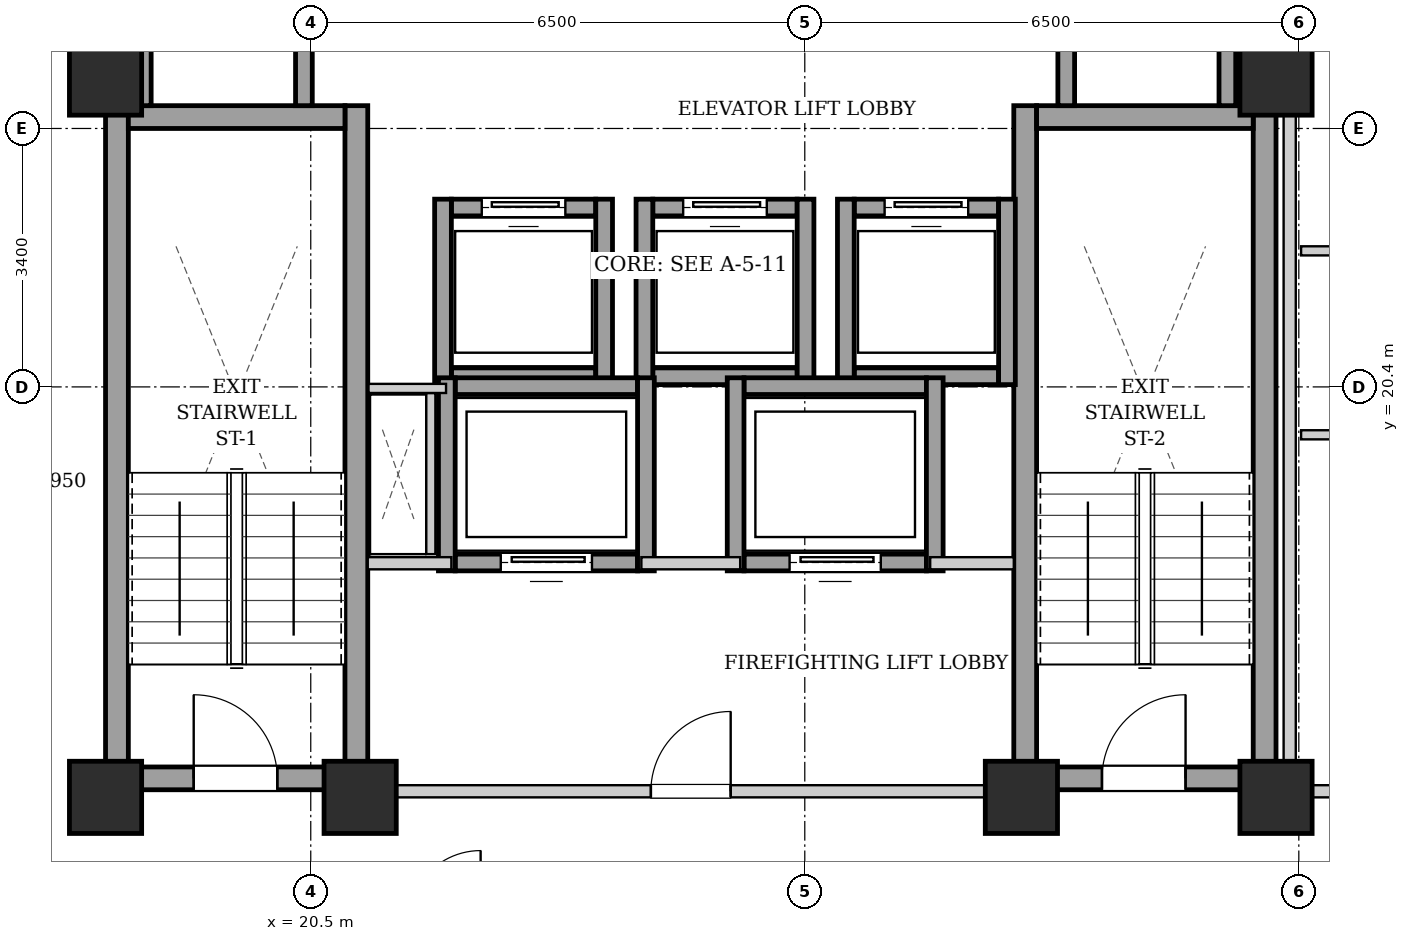
"""IFC4 building model, lengths in metres.
Left out: names, types, materials, properties, quantities, classifications, styles, units other than length and angle.
Written with IfcOpenShell. Run it as: python <this file> out.ifc"""

import sys

from ifc_helpers import new_model, si_unit, direction, frame, frame_2d, origin, origin_2d, place, context, subcontext, project, spatial, rectangle, extrude, element, fill, save


model = new_model("IFC4")
c1 = context("Model", 3, precision=1e-05, world=origin(), true_north=direction((0.0, 1.0)))
c2 = subcontext(c1, "Body", "Model", "MODEL_VIEW")
j1 = project(units=[si_unit("LENGTHUNIT", "METRE"), si_unit("PLANEANGLEUNIT", "RADIAN")], contexts=[c1])
p1 = place(None, origin())
s1 = spatial("IfcSite", under=j1, at=p1, CompositionType="ELEMENT")
p2 = place(p1, origin())
s2 = spatial("IfcBuilding", under=s1, at=p2, CompositionType="ELEMENT")
p3 = place(p2, frame((0.0, 0.0, 147.15)))
s3 = spatial("IfcBuildingStorey", under=s2, at=p3, CompositionType="ELEMENT", Elevation=147.15)
for number, where, z_axis, x_axis in (
    (1, (17.8, 15.0, 0.0), (0.0, 0.0, 1.0), (1.0, 0.0, 0.0)),
    (2, (21.15, 15.0, 0.0), (0.0, 0.0, 1.0), (1.0, 0.0, 0.0)),
    (3, (29.85, 15.0, 0.0), (0.0, 0.0, 1.0), (1.0, 0.0, 0.0)),
    (4, (33.2, 15.0, 0.0), (0.0, 0.0, 1.0), (1.0, 0.0, 0.0)),
    (5, (17.8, 24.45, 0.0), (0.0, 0.0, 1.0), (1.0, 0.0, 0.0)),
    (6, (33.2, 24.45, 0.0), (0.0, 0.0, 1.0), (1.0, 0.0, 0.0)),
):
    element("IfcColumn", number, at=place(p3, frame(where, z_axis=z_axis, x_axis=x_axis)), inside=s3, PredefinedType="COLUMN", context=c2, shape_type="SweptSolid", body=[
        extrude(rectangle(XDim=0.95, YDim=0.95, at=origin_2d()), origin(), (0.0, 0.0, 1.0), 3.25),
    ])
for number, where, z_axis, x_axis in (
    (7, (17.95, 15.1, 0.0), (0.0, 0.0, 1.0), (0.0, 1.0, 0.0)),
    (8, (21.1, 15.1, 0.0), (0.0, 0.0, 1.0), (0.0, 1.0, 0.0)),
):
    element("IfcWall", number, at=place(p3, frame(where, z_axis=z_axis, x_axis=x_axis)), inside=s3, PredefinedType="SHEAR", context=c2, shape_type="SweptSolid", body=[
        extrude(rectangle(XDim=9.0, YDim=0.3, at=frame_2d((4.5, 0.0))), origin(), (0.0, 0.0, 1.0), 2.99),
    ])
p4 = place(p3, frame((18.1, 23.95, 0.0), z_axis=(0.0, 0.0, 1.0), x_axis=(1.0, 0.0, 0.0)))
e9 = element("IfcWall", 9, at=p4, inside=s3, PredefinedType="SHEAR", context=c2, shape_type="SweptSolid", body=[
    extrude(rectangle(XDim=2.85, YDim=0.3, at=frame_2d((1.425, 0.0))), origin(), (0.0, 0.0, 1.0), 2.99),
])
p5 = place(p3, frame((18.1, 15.25, 0.0), z_axis=(0.0, 0.0, 1.0), x_axis=(1.0, 0.0, 0.0)))
e10 = element("IfcWall", 10, at=p5, inside=s3, PredefinedType="SHEAR", context=c2, shape_type="SweptSolid", body=[
    extrude(rectangle(XDim=2.85, YDim=0.3, at=frame_2d((1.425, 0.0))), origin(), (0.0, 0.0, 1.0), 2.99),
])
p6 = place(p5, frame((0.86, 0.0, 0.0)))
e11 = element("IfcOpeningElement", 11, at=p6, cuts=e10, PredefinedType="OPENING", context=c2, shape_type="SweptSolid", body=[
    extrude(rectangle(XDim=1.1, YDim=2.05, at=frame_2d((0.55, 1.025))), frame((0.0, 0.16, 0.0), z_axis=(0.0, -1.0, 0.0), x_axis=(1.0, 0.0, 0.0)), (0.0, 0.0, 1.0), 0.32),
])
for number, where, z_axis, x_axis in (
    (12, (29.9, 15.1, 0.0), (0.0, 0.0, 1.0), (0.0, 1.0, 0.0)),
    (13, (33.05, 15.1, 0.0), (0.0, 0.0, 1.0), (0.0, 1.0, 0.0)),
):
    element("IfcWall", number, at=place(p3, frame(where, z_axis=z_axis, x_axis=x_axis)), inside=s3, PredefinedType="SHEAR", context=c2, shape_type="SweptSolid", body=[
        extrude(rectangle(XDim=9.0, YDim=0.3, at=frame_2d((4.5, 0.0))), origin(), (0.0, 0.0, 1.0), 2.99),
    ])
p7 = place(p3, frame((30.05, 23.95, 0.0), z_axis=(0.0, 0.0, 1.0), x_axis=(1.0, 0.0, 0.0)))
e14 = element("IfcWall", 14, at=p7, inside=s3, PredefinedType="SHEAR", context=c2, shape_type="SweptSolid", body=[
    extrude(rectangle(XDim=2.85, YDim=0.3, at=frame_2d((1.425, 0.0))), origin(), (0.0, 0.0, 1.0), 2.99),
])
p8 = place(p3, frame((30.05, 15.25, 0.0), z_axis=(0.0, 0.0, 1.0), x_axis=(1.0, 0.0, 0.0)))
e15 = element("IfcWall", 15, at=p8, inside=s3, PredefinedType="SHEAR", context=c2, shape_type="SweptSolid", body=[
    extrude(rectangle(XDim=2.85, YDim=0.3, at=frame_2d((1.425, 0.0))), origin(), (0.0, 0.0, 1.0), 2.99),
])
p9 = place(p8, frame((0.86, 0.0, 0.0)))
e16 = element("IfcOpeningElement", 16, at=p9, cuts=e15, PredefinedType="OPENING", context=c2, shape_type="SweptSolid", body=[
    extrude(rectangle(XDim=1.1, YDim=2.05, at=frame_2d((0.55, 1.025))), frame((0.0, 0.16, 0.0), z_axis=(0.0, -1.0, 0.0), x_axis=(1.0, 0.0, 0.0)), (0.0, 0.0, 1.0), 0.32),
])
p10 = place(p3, frame((22.35, 20.54, 0.0), z_axis=(0.0, 0.0, 1.0), x_axis=(1.0, 0.0, 0.0)))
e17 = element("IfcWall", 17, at=p10, inside=s3, PredefinedType="SHEAR", context=c2, shape_type="SweptSolid", body=[
    extrude(rectangle(XDim=1.9, YDim=0.22, at=frame_2d((0.95, 0.0))), origin(), (0.0, 0.0, 1.0), 2.99),
])
p11 = place(p3, frame((22.35, 22.76, 0.0), z_axis=(0.0, 0.0, 1.0), x_axis=(1.0, 0.0, 0.0)))
e18 = element("IfcWall", 18, at=p11, inside=s3, PredefinedType="SHEAR", context=c2, shape_type="SweptSolid", body=[
    extrude(rectangle(XDim=1.9, YDim=0.22, at=frame_2d((0.95, 0.0))), origin(), (0.0, 0.0, 1.0), 2.99),
])
p12 = place(p11, frame((0.4, 0.0, 0.0)))
e19 = element("IfcOpeningElement", 19, at=p12, cuts=e18, PredefinedType="OPENING", context=c2, shape_type="SweptSolid", body=[
    extrude(rectangle(XDim=1.1, YDim=2.15, at=frame_2d((0.55, 1.075))), frame((0.0, 0.12, 0.0), z_axis=(0.0, -1.0, 0.0), x_axis=(1.0, 0.0, 0.0)), (0.0, 0.0, 1.0), 0.24),
])
for number, where, z_axis, x_axis in (
    (20, (22.24, 20.43, 0.0), (0.0, 0.0, 1.0), (0.0, 1.0, 0.0)),
    (21, (24.36, 20.43, 0.0), (0.0, 0.0, 1.0), (0.0, 1.0, 0.0)),
):
    element("IfcWall", number, at=place(p3, frame(where, z_axis=z_axis, x_axis=x_axis)), inside=s3, PredefinedType="SHEAR", context=c2, shape_type="SweptSolid", body=[
        extrude(rectangle(XDim=2.44, YDim=0.22, at=frame_2d((1.22, 0.0))), origin(), (0.0, 0.0, 1.0), 2.99),
    ])
p13 = place(p3, frame((25.0, 20.54, 0.0), z_axis=(0.0, 0.0, 1.0), x_axis=(1.0, 0.0, 0.0)))
e22 = element("IfcWall", 22, at=p13, inside=s3, PredefinedType="SHEAR", context=c2, shape_type="SweptSolid", body=[
    extrude(rectangle(XDim=1.9, YDim=0.22, at=frame_2d((0.95, 0.0))), origin(), (0.0, 0.0, 1.0), 2.99),
])
p14 = place(p3, frame((25.0, 22.76, 0.0), z_axis=(0.0, 0.0, 1.0), x_axis=(1.0, 0.0, 0.0)))
e23 = element("IfcWall", 23, at=p14, inside=s3, PredefinedType="SHEAR", context=c2, shape_type="SweptSolid", body=[
    extrude(rectangle(XDim=1.9, YDim=0.22, at=frame_2d((0.95, 0.0))), origin(), (0.0, 0.0, 1.0), 2.99),
])
p15 = place(p14, frame((0.4, 0.0, 0.0)))
e24 = element("IfcOpeningElement", 24, at=p15, cuts=e23, PredefinedType="OPENING", context=c2, shape_type="SweptSolid", body=[
    extrude(rectangle(XDim=1.1, YDim=2.15, at=frame_2d((0.55, 1.075))), frame((0.0, 0.12, 0.0), z_axis=(0.0, -1.0, 0.0), x_axis=(1.0, 0.0, 0.0)), (0.0, 0.0, 1.0), 0.24),
])
for number, where, z_axis, x_axis in (
    (25, (24.89, 20.43, 0.0), (0.0, 0.0, 1.0), (0.0, 1.0, 0.0)),
    (26, (27.01, 20.43, 0.0), (0.0, 0.0, 1.0), (0.0, 1.0, 0.0)),
):
    element("IfcWall", number, at=place(p3, frame(where, z_axis=z_axis, x_axis=x_axis)), inside=s3, PredefinedType="SHEAR", context=c2, shape_type="SweptSolid", body=[
        extrude(rectangle(XDim=2.44, YDim=0.22, at=frame_2d((1.22, 0.0))), origin(), (0.0, 0.0, 1.0), 2.99),
    ])
p16 = place(p3, frame((27.65, 20.54, 0.0), z_axis=(0.0, 0.0, 1.0), x_axis=(1.0, 0.0, 0.0)))
e27 = element("IfcWall", 27, at=p16, inside=s3, PredefinedType="SHEAR", context=c2, shape_type="SweptSolid", body=[
    extrude(rectangle(XDim=1.9, YDim=0.22, at=frame_2d((0.95, 0.0))), origin(), (0.0, 0.0, 1.0), 2.99),
])
p17 = place(p3, frame((27.65, 22.76, 0.0), z_axis=(0.0, 0.0, 1.0), x_axis=(1.0, 0.0, 0.0)))
e28 = element("IfcWall", 28, at=p17, inside=s3, PredefinedType="SHEAR", context=c2, shape_type="SweptSolid", body=[
    extrude(rectangle(XDim=1.9, YDim=0.22, at=frame_2d((0.95, 0.0))), origin(), (0.0, 0.0, 1.0), 2.99),
])
p18 = place(p17, frame((0.4, 0.0, 0.0)))
e29 = element("IfcOpeningElement", 29, at=p18, cuts=e28, PredefinedType="OPENING", context=c2, shape_type="SweptSolid", body=[
    extrude(rectangle(XDim=1.1, YDim=2.15, at=frame_2d((0.55, 1.075))), frame((0.0, 0.12, 0.0), z_axis=(0.0, -1.0, 0.0), x_axis=(1.0, 0.0, 0.0)), (0.0, 0.0, 1.0), 0.24),
])
for number, where, z_axis, x_axis in (
    (30, (27.54, 20.43, 0.0), (0.0, 0.0, 1.0), (0.0, 1.0, 0.0)),
    (31, (29.66, 20.43, 0.0), (0.0, 0.0, 1.0), (0.0, 1.0, 0.0)),
):
    element("IfcWall", number, at=place(p3, frame(where, z_axis=z_axis, x_axis=x_axis)), inside=s3, PredefinedType="SHEAR", context=c2, shape_type="SweptSolid", body=[
        extrude(rectangle(XDim=2.44, YDim=0.22, at=frame_2d((1.22, 0.0))), origin(), (0.0, 0.0, 1.0), 2.99),
    ])
p19 = place(p3, frame((18.29, 24.1, 0.0), z_axis=(0.0, 0.0, 1.0), x_axis=(0.0, 1.0, 0.0)))
e32 = element("IfcWall", 32, at=p19, inside=s3, PredefinedType="SHEAR", context=c2, shape_type="SweptSolid", body=[
    extrude(rectangle(XDim=4.14, YDim=0.22, at=frame_2d((2.07, 0.0))), origin(), (0.0, 0.0, 1.0), 2.99),
])
p20 = place(p3, frame((20.41, 24.1, 0.0), z_axis=(0.0, 0.0, 1.0), x_axis=(0.0, 1.0, 0.0)))
e33 = element("IfcWall", 33, at=p20, inside=s3, PredefinedType="SHEAR", context=c2, shape_type="SweptSolid", body=[
    extrude(rectangle(XDim=1.96, YDim=0.22, at=frame_2d((0.98, 0.0))), origin(), (0.0, 0.0, 1.0), 2.99),
])
for number, where, z_axis, x_axis in (
    (34, (30.44, 24.1, 0.0), (0.0, 0.0, 1.0), (0.0, 1.0, 0.0)),
    (35, (32.56, 24.1, 0.0), (0.0, 0.0, 1.0), (0.0, 1.0, 0.0)),
):
    element("IfcWall", number, at=place(p3, frame(where, z_axis=z_axis, x_axis=x_axis)), inside=s3, PredefinedType="SHEAR", context=c2, shape_type="SweptSolid", body=[
        extrude(rectangle(XDim=2.07, YDim=0.22, at=frame_2d((1.035, 0.0))), origin(), (0.0, 0.0, 1.0), 2.99),
    ])
p21 = place(p3, frame((22.4, 18.09, 0.0), z_axis=(0.0, 0.0, 1.0), x_axis=(1.0, 0.0, 0.0)))
e36 = element("IfcWall", 36, at=p21, inside=s3, PredefinedType="SHEAR", context=c2, shape_type="SweptSolid", body=[
    extrude(rectangle(XDim=2.4, YDim=0.22, at=frame_2d((1.2, 0.0))), origin(), (0.0, 0.0, 1.0), 2.99),
])
p22 = place(p21, frame((0.6, 0.0, 0.0)))
e37 = element("IfcOpeningElement", 37, at=p22, cuts=e36, PredefinedType="OPENING", context=c2, shape_type="SweptSolid", body=[
    extrude(rectangle(XDim=1.2, YDim=2.15, at=frame_2d((0.6, 1.075))), frame((0.0, 0.12, 0.0), z_axis=(0.0, -1.0, 0.0), x_axis=(1.0, 0.0, 0.0)), (0.0, 0.0, 1.0), 0.24),
])
p23 = place(p3, frame((22.4, 20.41, 0.0), z_axis=(0.0, 0.0, 1.0), x_axis=(1.0, 0.0, 0.0)))
e38 = element("IfcWall", 38, at=p23, inside=s3, PredefinedType="SHEAR", context=c2, shape_type="SweptSolid", body=[
    extrude(rectangle(XDim=2.4, YDim=0.22, at=frame_2d((1.2, 0.0))), origin(), (0.0, 0.0, 1.0), 2.99),
])
for number, where, z_axis, x_axis in (
    (39, (22.29, 17.98, 0.0), (0.0, 0.0, 1.0), (0.0, 1.0, 0.0)),
    (40, (24.91, 17.98, 0.0), (0.0, 0.0, 1.0), (0.0, 1.0, 0.0)),
):
    element("IfcWall", number, at=place(p3, frame(where, z_axis=z_axis, x_axis=x_axis)), inside=s3, PredefinedType="SHEAR", context=c2, shape_type="SweptSolid", body=[
        extrude(rectangle(XDim=2.54, YDim=0.22, at=frame_2d((1.27, 0.0))), origin(), (0.0, 0.0, 1.0), 2.99),
    ])
p24 = place(p3, frame((26.2, 18.09, 0.0), z_axis=(0.0, 0.0, 1.0), x_axis=(1.0, 0.0, 0.0)))
e41 = element("IfcWall", 41, at=p24, inside=s3, PredefinedType="SHEAR", context=c2, shape_type="SweptSolid", body=[
    extrude(rectangle(XDim=2.4, YDim=0.22, at=frame_2d((1.2, 0.0))), origin(), (0.0, 0.0, 1.0), 2.99),
])
p25 = place(p24, frame((0.6, 0.0, 0.0)))
e42 = element("IfcOpeningElement", 42, at=p25, cuts=e41, PredefinedType="OPENING", context=c2, shape_type="SweptSolid", body=[
    extrude(rectangle(XDim=1.2, YDim=2.15, at=frame_2d((0.6, 1.075))), frame((0.0, 0.12, 0.0), z_axis=(0.0, -1.0, 0.0), x_axis=(1.0, 0.0, 0.0)), (0.0, 0.0, 1.0), 0.24),
])
p26 = place(p3, frame((26.2, 20.41, 0.0), z_axis=(0.0, 0.0, 1.0), x_axis=(1.0, 0.0, 0.0)))
e43 = element("IfcWall", 43, at=p26, inside=s3, PredefinedType="SHEAR", context=c2, shape_type="SweptSolid", body=[
    extrude(rectangle(XDim=2.4, YDim=0.22, at=frame_2d((1.2, 0.0))), origin(), (0.0, 0.0, 1.0), 2.99),
])
for number, where, z_axis, x_axis in (
    (44, (26.09, 17.98, 0.0), (0.0, 0.0, 1.0), (0.0, 1.0, 0.0)),
    (45, (28.71, 17.98, 0.0), (0.0, 0.0, 1.0), (0.0, 1.0, 0.0)),
):
    element("IfcWall", number, at=place(p3, frame(where, z_axis=z_axis, x_axis=x_axis)), inside=s3, PredefinedType="SHEAR", context=c2, shape_type="SweptSolid", body=[
        extrude(rectangle(XDim=2.54, YDim=0.22, at=frame_2d((1.27, 0.0))), origin(), (0.0, 0.0, 1.0), 2.99),
    ])
p27 = place(p3, frame((21.25, 15.08, 0.0), z_axis=(0.0, 0.0, 1.0), x_axis=(1.0, 0.0, 0.0)))
e46 = element("IfcWall", 46, at=p27, inside=s3, PredefinedType="PARTITIONING", context=c2, shape_type="SweptSolid", body=[
    extrude(rectangle(XDim=8.5, YDim=0.16, at=frame_2d((4.25, 0.0))), origin(), (0.0, 0.0, 1.0), 2.442),
])
p28 = place(p27, frame((3.725, 0.0, 0.0)))
e47 = element("IfcOpeningElement", 47, at=p28, cuts=e46, PredefinedType="OPENING", context=c2, shape_type="SweptSolid", body=[
    extrude(rectangle(XDim=1.05, YDim=2.05, at=frame_2d((0.525, 1.025))), frame((0.0, 0.09, 0.0), z_axis=(0.0, -1.0, 0.0), x_axis=(1.0, 0.0, 0.0)), (0.0, 0.0, 1.0), 0.18),
])
p29 = place(p3, frame((21.25, 18.08, 0.0), z_axis=(0.0, 0.0, 1.0), x_axis=(1.0, 0.0, 0.0)))
e48 = element("IfcWall", 48, at=p29, inside=s3, PredefinedType="PARTITIONING", context=c2, shape_type="SweptSolid", body=[
    extrude(rectangle(XDim=1.1, YDim=0.16, at=frame_2d((0.55, 0.0))), origin(), (0.0, 0.0, 1.0), 2.99),
])
p30 = place(p3, frame((24.85, 18.08, 0.0), z_axis=(0.0, 0.0, 1.0), x_axis=(1.0, 0.0, 0.0)))
e49 = element("IfcWall", 49, at=p30, inside=s3, PredefinedType="PARTITIONING", context=c2, shape_type="SweptSolid", body=[
    extrude(rectangle(XDim=1.3, YDim=0.16, at=frame_2d((0.65, 0.0))), origin(), (0.0, 0.0, 1.0), 2.99),
])
p31 = place(p3, frame((28.65, 18.08, 0.0), z_axis=(0.0, 0.0, 1.0), x_axis=(1.0, 0.0, 0.0)))
e50 = element("IfcWall", 50, at=p31, inside=s3, PredefinedType="PARTITIONING", context=c2, shape_type="SweptSolid", body=[
    extrude(rectangle(XDim=1.1, YDim=0.16, at=frame_2d((0.55, 0.0))), origin(), (0.0, 0.0, 1.0), 2.99),
])
for number, where, z_axis, x_axis in (
    (51, (17.88, 24.12, 0.0), (0.0, 0.0, 1.0), (0.0, 1.0, 0.0)),
    (52, (33.12, 24.12, 0.0), (0.0, 0.0, 1.0), (0.0, 1.0, 0.0)),
):
    element("IfcWall", number, at=place(p3, frame(where, z_axis=z_axis, x_axis=x_axis)), inside=s3, PredefinedType="PARTITIONING", context=c2, shape_type="SweptSolid", body=[
        extrude(rectangle(XDim=4.76, YDim=0.16, at=frame_2d((2.38, 0.0))), origin(), (0.0, 0.0, 1.0), 2.325),
    ])
p32 = place(p3, frame((22.08, 18.2, 0.0), z_axis=(0.0, 0.0, 1.0), x_axis=(0.0, 1.0, 0.0)))
e53 = element("IfcWall", 53, at=p32, inside=s3, PredefinedType="PARTITIONING", context=c2, shape_type="SweptSolid", body=[
    extrude(rectangle(XDim=2.12, YDim=0.12, at=frame_2d((1.06, 0.0))), origin(), (0.0, 0.0, 1.0), 2.99),
])
p33 = place(p3, frame((22.28, 20.38, 0.0), z_axis=(0.0, 0.0, 1.0), x_axis=(-1.0, 0.0, 0.0)))
e54 = element("IfcWall", 54, at=p33, inside=s3, PredefinedType="PARTITIONING", context=c2, shape_type="SweptSolid", body=[
    extrude(rectangle(XDim=1.02, YDim=0.12, at=frame_2d((0.51, 0.0))), origin(), (0.0, 0.0, 1.0), 2.99),
])
p34 = place(p3, frame((33.38, 15.08, 0.0), z_axis=(0.0, 0.0, 1.0), x_axis=(1.0, 0.0, 0.0)))
e55 = element("IfcWall", 55, at=p34, inside=s3, PredefinedType="PARTITIONING", context=c2, shape_type="SweptSolid", body=[
    extrude(rectangle(XDim=6.64, YDim=0.16, at=frame_2d((3.32, 0.0))), origin(), (0.0, 0.0, 1.0), 2.442),
])
p35 = place(p34, frame((0.9, 0.0, 0.0)))
e56 = element("IfcOpeningElement", 56, at=p35, cuts=e55, PredefinedType="OPENING", context=c2, shape_type="SweptSolid", body=[
    extrude(rectangle(XDim=0.95, YDim=2.1, at=frame_2d((0.475, 1.05))), frame((0.0, 0.09, 0.0), z_axis=(0.0, -1.0, 0.0), x_axis=(1.0, 0.0, 0.0)), (0.0, 0.0, 1.0), 0.18),
])
p36 = place(p3, frame((33.53, 22.19, 0.0), z_axis=(0.0, 0.0, 1.0), x_axis=(1.0, 0.0, 0.0)))
e57 = element("IfcWall", 57, at=p36, inside=s3, PredefinedType="PARTITIONING", context=c2, shape_type="SweptSolid", body=[
    extrude(rectangle(XDim=2.45, YDim=0.12, at=frame_2d((1.225, 0.0))), origin(), (0.0, 0.0, 1.0), 2.99),
])
p37 = place(p3, frame((33.53, 19.77, 0.0), z_axis=(0.0, 0.0, 1.0), x_axis=(1.0, 0.0, 0.0)))
e58 = element("IfcWall", 58, at=p37, inside=s3, PredefinedType="PARTITIONING", context=c2, shape_type="SweptSolid", body=[
    extrude(rectangle(XDim=2.45, YDim=0.12, at=frame_2d((1.225, 0.0))), origin(), (0.0, 0.0, 1.0), 2.99),
])
p38 = place(p37, frame((0.795, 0.0, 0.0)))
e59 = element("IfcOpeningElement", 59, at=p38, cuts=e58, PredefinedType="OPENING", context=c2, shape_type="SweptSolid", body=[
    extrude(rectangle(XDim=0.86, YDim=2.05, at=frame_2d((0.43, 1.025))), frame((0.0, 0.07, 0.0), z_axis=(0.0, -1.0, 0.0), x_axis=(1.0, 0.0, 0.0)), (0.0, 0.0, 1.0), 0.14),
])
p39 = place(p3, frame((33.38, 15.02, 0.0), z_axis=(0.0, 0.0, 1.0), x_axis=(0.0, 1.0, 0.0)))
e60 = element("IfcWall", 60, at=p39, inside=s3, PredefinedType="PARTITIONING", context=c2, shape_type="SweptSolid", body=[
    extrude(rectangle(XDim=13.98, YDim=0.16, at=frame_2d((6.99, 0.0))), origin(), (0.0, 0.0, 1.0), 2.325),
])
p40 = place(p6, origin())
e61 = element("IfcDoor", 61, at=p40, inside=s3, OperationType="SINGLE_SWING_LEFT", PredefinedType="DOOR", context=c2, shape_type="SweptSolid", body=[
    extrude(rectangle(XDim=1.1, YDim=2.05, at=frame_2d((0.55, 1.025))), frame((0.0, 0.025, 0.0), z_axis=(0.0, -1.0, 0.0), x_axis=(1.0, 0.0, 0.0)), (0.0, 0.0, 1.0), 0.05),
])
fill(e11, e61)
p41 = place(p9, origin())
e62 = element("IfcDoor", 62, at=p41, inside=s3, OperationType="SINGLE_SWING_RIGHT", PredefinedType="DOOR", context=c2, shape_type="SweptSolid", body=[
    extrude(rectangle(XDim=1.1, YDim=2.05, at=frame_2d((0.55, 1.025))), frame((0.0, 0.025, 0.0), z_axis=(0.0, -1.0, 0.0), x_axis=(1.0, 0.0, 0.0)), (0.0, 0.0, 1.0), 0.05),
])
fill(e16, e62)
p42 = place(p12, origin())
e63 = element("IfcDoor", 63, at=p42, inside=s3, OperationType="SLIDING_TO_LEFT", PredefinedType="DOOR", context=c2, shape_type="SweptSolid", body=[
    extrude(rectangle(XDim=1.1, YDim=2.15, at=frame_2d((0.55, 1.075))), frame((0.0, 0.025, 0.0), z_axis=(0.0, -1.0, 0.0), x_axis=(1.0, 0.0, 0.0)), (0.0, 0.0, 1.0), 0.05),
])
fill(e19, e63)
p43 = place(p15, origin())
e64 = element("IfcDoor", 64, at=p43, inside=s3, OperationType="SLIDING_TO_LEFT", PredefinedType="DOOR", context=c2, shape_type="SweptSolid", body=[
    extrude(rectangle(XDim=1.1, YDim=2.15, at=frame_2d((0.55, 1.075))), frame((0.0, 0.025, 0.0), z_axis=(0.0, -1.0, 0.0), x_axis=(1.0, 0.0, 0.0)), (0.0, 0.0, 1.0), 0.05),
])
fill(e24, e64)
p44 = place(p18, origin())
e65 = element("IfcDoor", 65, at=p44, inside=s3, OperationType="SLIDING_TO_LEFT", PredefinedType="DOOR", context=c2, shape_type="SweptSolid", body=[
    extrude(rectangle(XDim=1.1, YDim=2.15, at=frame_2d((0.55, 1.075))), frame((0.0, 0.025, 0.0), z_axis=(0.0, -1.0, 0.0), x_axis=(1.0, 0.0, 0.0)), (0.0, 0.0, 1.0), 0.05),
])
fill(e29, e65)
p45 = place(p22, origin())
e66 = element("IfcDoor", 66, at=p45, inside=s3, OperationType="SLIDING_TO_LEFT", PredefinedType="DOOR", context=c2, shape_type="SweptSolid", body=[
    extrude(rectangle(XDim=1.2, YDim=2.15, at=frame_2d((0.6, 1.075))), frame((0.0, 0.025, 0.0), z_axis=(0.0, -1.0, 0.0), x_axis=(1.0, 0.0, 0.0)), (0.0, 0.0, 1.0), 0.05),
])
fill(e37, e66)
p46 = place(p25, origin())
e67 = element("IfcDoor", 67, at=p46, inside=s3, OperationType="SLIDING_TO_LEFT", PredefinedType="DOOR", context=c2, shape_type="SweptSolid", body=[
    extrude(rectangle(XDim=1.2, YDim=2.15, at=frame_2d((0.6, 1.075))), frame((0.0, 0.025, 0.0), z_axis=(0.0, -1.0, 0.0), x_axis=(1.0, 0.0, 0.0)), (0.0, 0.0, 1.0), 0.05),
])
fill(e42, e67)
p47 = place(p28, origin())
e68 = element("IfcDoor", 68, at=p47, inside=s3, OperationType="SINGLE_SWING_RIGHT", PredefinedType="DOOR", context=c2, shape_type="SweptSolid", body=[
    extrude(rectangle(XDim=1.05, YDim=2.05, at=frame_2d((0.525, 1.025))), frame((0.0, 0.025, 0.0), z_axis=(0.0, -1.0, 0.0), x_axis=(1.0, 0.0, 0.0)), (0.0, 0.0, 1.0), 0.05),
])
fill(e47, e68)
save(model, sys.argv[1])
